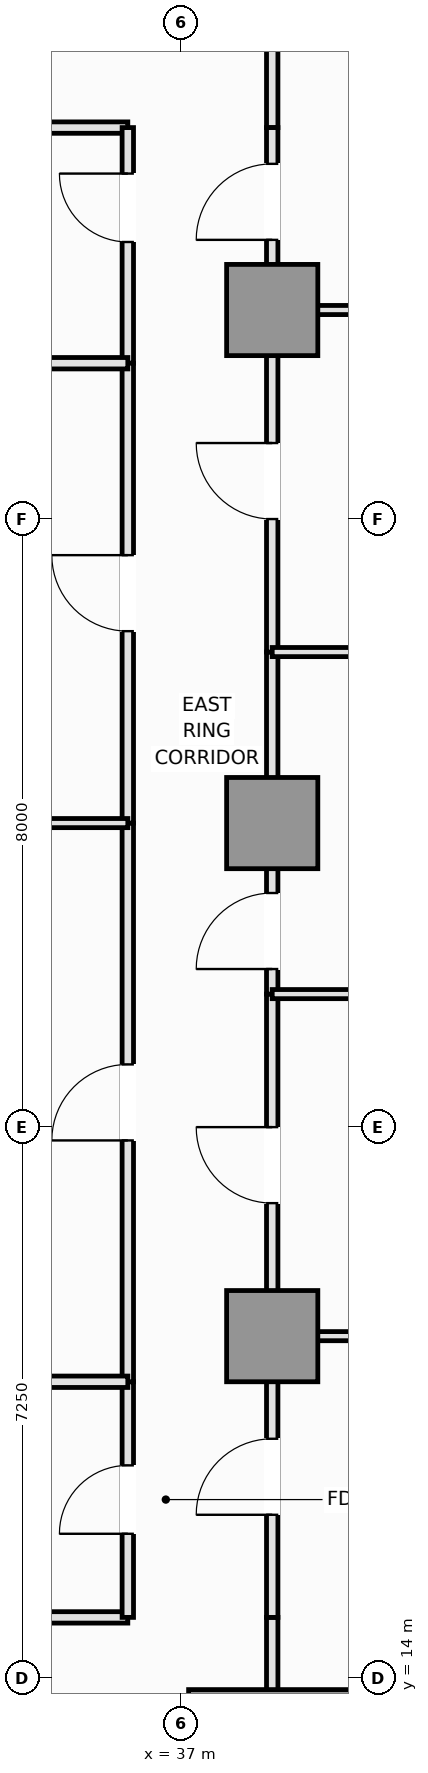
"""IFC4 building model, lengths in metres.
Left out: names, types, materials, properties, quantities, classifications, styles, units other than length and angle.
Written with IfcOpenShell. Run it as: python <this file> out.ifc"""

import sys

from ifc_helpers import new_model, si_unit, direction, frame, frame_2d, origin, origin_2d, place, context, subcontext, project, spatial, rectangle, extrude, element, fill, save


model = new_model("IFC4")
c1 = context("Model", 3, precision=1e-05, world=origin(), true_north=direction((0.0, 1.0)))
c2 = subcontext(c1, "Body", "Model", "MODEL_VIEW")
j1 = project(units=[si_unit("LENGTHUNIT", "METRE"), si_unit("PLANEANGLEUNIT", "RADIAN")], contexts=[c1])
p1 = place(None, origin())
s1 = spatial("IfcSite", under=j1, at=p1, CompositionType="ELEMENT")
p2 = place(p1, origin())
s2 = spatial("IfcBuilding", under=s1, at=p2, CompositionType="ELEMENT")
p3 = place(p2, frame((0.0, 0.0, 82.4)))
s3 = spatial("IfcBuildingStorey", under=s2, at=p3, CompositionType="ELEMENT", Elevation=82.4)
p4 = place(p3, frame((38.2, 12.75, 0.0), z_axis=(0.0, 0.0, 1.0), x_axis=(1.0, 0.0, 0.0)))
e1 = element("IfcColumn", 1, at=p4, inside=s3, PredefinedType="COLUMN", context=c2, shape_type="SweptSolid", body=[
    extrude(rectangle(XDim=2.2, YDim=2.2, at=origin_2d()), origin(), (0.0, 0.0, 1.0), 3.55),
])
for number, where, z_axis, x_axis in (
    (2, (38.2, 18.5, 0.0), (0.0, 0.0, 1.0), (1.0, 0.0, 0.0)),
    (3, (38.2, 25.25, 0.0), (0.0, 0.0, 1.0), (1.0, 0.0, 0.0)),
    (4, (38.2, 32.0, 0.0), (0.0, 0.0, 1.0), (1.0, 0.0, 0.0)),
):
    element("IfcColumn", number, at=place(p3, frame(where, z_axis=z_axis, x_axis=x_axis)), inside=s3, PredefinedType="COLUMN", context=c2, shape_type="SweptSolid", body=[
        extrude(rectangle(XDim=1.2, YDim=1.2, at=origin_2d()), origin(), (0.0, 0.0, 1.0), 3.55),
    ])
p5 = place(p3, frame((33.1, 14.8, 0.0), z_axis=(0.0, 0.0, 1.0), x_axis=(1.0, 0.0, 0.0)))
e5 = element("IfcWall", 5, at=p5, inside=s3, PredefinedType="PLUMBINGWALL", context=c2, shape_type="SweptSolid", body=[
    extrude(rectangle(XDim=3.2, YDim=0.15, at=frame_2d((1.6, 0.0))), origin(), (0.0, 0.0, 1.0), 3.37),
])
p6 = place(p3, frame((38.2, 12.9, 0.0), z_axis=(0.0, 0.0, 1.0), x_axis=(0.0, 1.0, 0.0)))
e6 = element("IfcWall", 6, at=p6, inside=s3, PredefinedType="PARTITIONING", context=c2, shape_type="SweptSolid", body=[
    extrude(rectangle(XDim=1.9, YDim=0.15, at=frame_2d((0.95, 0.0))), origin(), (0.0, 0.0, 1.0), 2.82),
])
p7 = place(p3, frame((33.1, 34.4, 0.0), z_axis=(0.0, 0.0, 1.0), x_axis=(1.0, 0.0, 0.0)))
e7 = element("IfcWall", 7, at=p7, inside=s3, PredefinedType="PLUMBINGWALL", context=c2, shape_type="SweptSolid", body=[
    extrude(rectangle(XDim=3.2, YDim=0.15, at=frame_2d((1.6, 0.0))), origin(), (0.0, 0.0, 1.0), 3.37),
])
p8 = place(p3, frame((38.2, 34.4, 0.0), z_axis=(0.0, 0.0, 1.0), x_axis=(0.0, 1.0, 0.0)))
e8 = element("IfcWall", 8, at=p8, inside=s3, PredefinedType="PARTITIONING", context=c2, shape_type="SweptSolid", body=[
    extrude(rectangle(XDim=1.9, YDim=0.15, at=frame_2d((0.95, 0.0))), origin(), (0.0, 0.0, 1.0), 2.82),
])
p9 = place(p3, frame((36.3, 14.8, 0.0), z_axis=(0.0, 0.0, 1.0), x_axis=(0.0, 1.0, 0.0)))
e9 = element("IfcWall", 9, at=p9, inside=s3, PredefinedType="PLUMBINGWALL", context=c2, shape_type="SweptSolid", body=[
    extrude(rectangle(XDim=3.1, YDim=0.15, at=frame_2d((1.55, 0.0))), origin(), (0.0, 0.0, 1.0), 3.37),
])
p10 = place(p9, frame((1.1, 0.0, 0.0)))
e10 = element("IfcOpeningElement", 10, at=p10, cuts=e9, PredefinedType="OPENING", context=c2, shape_type="SweptSolid", body=[
    extrude(rectangle(XDim=0.9, YDim=2.1, at=frame_2d((0.45, 1.05))), frame((0.0, 0.085, 0.0), z_axis=(0.0, -1.0, 0.0), x_axis=(1.0, 0.0, 0.0)), (0.0, 0.0, 1.0), 0.17),
])
p11 = place(p3, frame((36.3, 31.3, 0.0), z_axis=(0.0, 0.0, 1.0), x_axis=(0.0, 1.0, 0.0)))
e11 = element("IfcWall", 11, at=p11, inside=s3, PredefinedType="PLUMBINGWALL", context=c2, shape_type="SweptSolid", body=[
    extrude(rectangle(XDim=3.1, YDim=0.15, at=frame_2d((1.55, 0.0))), origin(), (0.0, 0.0, 1.0), 3.37),
])
p12 = place(p11, frame((1.595, 0.0, 0.0)))
e12 = element("IfcOpeningElement", 12, at=p12, cuts=e11, PredefinedType="OPENING", context=c2, shape_type="SweptSolid", body=[
    extrude(rectangle(XDim=0.9, YDim=2.1, at=frame_2d((0.45, 1.05))), frame((0.0, 0.085, 0.0), z_axis=(0.0, -1.0, 0.0), x_axis=(1.0, 0.0, 0.0)), (0.0, 0.0, 1.0), 0.17),
])
p13 = place(p3, frame((36.3, 17.9, 0.0), z_axis=(0.0, 0.0, 1.0), x_axis=(0.0, 1.0, 0.0)))
e13 = element("IfcWall", 13, at=p13, inside=s3, PredefinedType="PARTITIONING", context=c2, shape_type="SweptSolid", body=[
    extrude(rectangle(XDim=7.35, YDim=0.15, at=frame_2d((3.675, 0.0))), origin(), (0.0, 0.0, 1.0), 3.37),
])
p14 = place(p13, frame((3.175, 0.0, 0.0)))
e14 = element("IfcOpeningElement", 14, at=p14, cuts=e13, PredefinedType="OPENING", context=c2, shape_type="SweptSolid", body=[
    extrude(rectangle(XDim=1.0, YDim=2.15, at=frame_2d((0.5, 1.075))), frame((0.0, 0.085, 0.0), z_axis=(0.0, -1.0, 0.0), x_axis=(1.0, 0.0, 0.0)), (0.0, 0.0, 1.0), 0.17),
])
p15 = place(p3, frame((36.3, 25.25, 0.0), z_axis=(0.0, 0.0, 1.0), x_axis=(0.0, 1.0, 0.0)))
e15 = element("IfcWall", 15, at=p15, inside=s3, PredefinedType="PARTITIONING", context=c2, shape_type="SweptSolid", body=[
    extrude(rectangle(XDim=6.05, YDim=0.15, at=frame_2d((3.025, 0.0))), origin(), (0.0, 0.0, 1.0), 3.37),
])
p16 = place(p15, frame((2.525, 0.0, 0.0)))
e16 = element("IfcOpeningElement", 16, at=p16, cuts=e15, PredefinedType="OPENING", context=c2, shape_type="SweptSolid", body=[
    extrude(rectangle(XDim=1.0, YDim=2.15, at=frame_2d((0.5, 1.075))), frame((0.0, 0.085, 0.0), z_axis=(0.0, -1.0, 0.0), x_axis=(1.0, 0.0, 0.0)), (0.0, 0.0, 1.0), 0.17),
])
p17 = place(p3, frame((38.2, 14.8, 0.0), z_axis=(0.0, 0.0, 1.0), x_axis=(0.0, 1.0, 0.0)))
e17 = element("IfcWall", 17, at=p17, inside=s3, PredefinedType="PARTITIONING", context=c2, shape_type="SweptSolid", body=[
    extrude(rectangle(XDim=3.7, YDim=0.15, at=frame_2d((1.85, 0.0))), origin(), (0.0, 0.0, 1.0), 2.82),
])
p18 = place(p17, frame((1.35, 0.0, 0.0)))
e18 = element("IfcOpeningElement", 18, at=p18, cuts=e17, PredefinedType="OPENING", context=c2, shape_type="SweptSolid", body=[
    extrude(rectangle(XDim=1.0, YDim=2.15, at=frame_2d((0.5, 1.075))), frame((0.0, 0.085, 0.0), z_axis=(0.0, -1.0, 0.0), x_axis=(1.0, 0.0, 0.0)), (0.0, 0.0, 1.0), 0.17),
])
p19 = place(p3, frame((38.2, 18.5, 0.0), z_axis=(0.0, 0.0, 1.0), x_axis=(0.0, 1.0, 0.0)))
e19 = element("IfcWall", 19, at=p19, inside=s3, PredefinedType="PARTITIONING", context=c2, shape_type="SweptSolid", body=[
    extrude(rectangle(XDim=4.5, YDim=0.15, at=frame_2d((2.25, 0.0))), origin(), (0.0, 0.0, 1.0), 2.82),
])
p20 = place(p19, frame((1.75, 0.0, 0.0)))
e20 = element("IfcOpeningElement", 20, at=p20, cuts=e19, PredefinedType="OPENING", context=c2, shape_type="SweptSolid", body=[
    extrude(rectangle(XDim=1.0, YDim=2.15, at=frame_2d((0.5, 1.075))), frame((0.0, 0.085, 0.0), z_axis=(0.0, -1.0, 0.0), x_axis=(1.0, 0.0, 0.0)), (0.0, 0.0, 1.0), 0.17),
])
p21 = place(p3, frame((38.2, 23.0, 0.0), z_axis=(0.0, 0.0, 1.0), x_axis=(0.0, 1.0, 0.0)))
e21 = element("IfcWall", 21, at=p21, inside=s3, PredefinedType="PARTITIONING", context=c2, shape_type="SweptSolid", body=[
    extrude(rectangle(XDim=4.5, YDim=0.15, at=frame_2d((2.25, 0.0))), origin(), (0.0, 0.0, 1.0), 2.82),
])
p22 = place(p21, frame((0.33, 0.0, 0.0)))
e22 = element("IfcOpeningElement", 22, at=p22, cuts=e21, PredefinedType="OPENING", context=c2, shape_type="SweptSolid", body=[
    extrude(rectangle(XDim=1.0, YDim=2.15, at=frame_2d((0.5, 1.075))), frame((0.0, 0.085, 0.0), z_axis=(0.0, -1.0, 0.0), x_axis=(1.0, 0.0, 0.0)), (0.0, 0.0, 1.0), 0.17),
])
p23 = place(p3, frame((38.2, 27.5, 0.0), z_axis=(0.0, 0.0, 1.0), x_axis=(0.0, 1.0, 0.0)))
e23 = element("IfcWall", 23, at=p23, inside=s3, PredefinedType="PARTITIONING", context=c2, shape_type="SweptSolid", body=[
    extrude(rectangle(XDim=4.5, YDim=0.15, at=frame_2d((2.25, 0.0))), origin(), (0.0, 0.0, 1.0), 2.82),
])
p24 = place(p23, frame((1.75, 0.0, 0.0)))
e24 = element("IfcOpeningElement", 24, at=p24, cuts=e23, PredefinedType="OPENING", context=c2, shape_type="SweptSolid", body=[
    extrude(rectangle(XDim=1.0, YDim=2.15, at=frame_2d((0.5, 1.075))), frame((0.0, 0.085, 0.0), z_axis=(0.0, -1.0, 0.0), x_axis=(1.0, 0.0, 0.0)), (0.0, 0.0, 1.0), 0.17),
])
p25 = place(p3, frame((38.2, 32.0, 0.0), z_axis=(0.0, 0.0, 1.0), x_axis=(0.0, 1.0, 0.0)))
e25 = element("IfcWall", 25, at=p25, inside=s3, PredefinedType="PARTITIONING", context=c2, shape_type="SweptSolid", body=[
    extrude(rectangle(XDim=2.4, YDim=0.15, at=frame_2d((1.2, 0.0))), origin(), (0.0, 0.0, 1.0), 2.82),
])
p26 = place(p25, frame((0.923, 0.0, 0.0)))
e26 = element("IfcOpeningElement", 26, at=p26, cuts=e25, PredefinedType="OPENING", context=c2, shape_type="SweptSolid", body=[
    extrude(rectangle(XDim=1.0, YDim=2.15, at=frame_2d((0.5, 1.075))), frame((0.0, 0.085, 0.0), z_axis=(0.0, -1.0, 0.0), x_axis=(1.0, 0.0, 0.0)), (0.0, 0.0, 1.0), 0.17),
])
for number, where, z_axis, x_axis in (
    (27, (33.1, 17.9, 0.0), (0.0, 0.0, 1.0), (1.0, 0.0, 0.0)),
    (28, (33.1, 31.3, 0.0), (0.0, 0.0, 1.0), (1.0, 0.0, 0.0)),
):
    element("IfcWall", number, at=place(p3, frame(where, z_axis=z_axis, x_axis=x_axis)), inside=s3, PredefinedType="PLUMBINGWALL", context=c2, shape_type="SweptSolid", body=[
        extrude(rectangle(XDim=3.2, YDim=0.15, at=frame_2d((1.6, 0.0))), origin(), (0.0, 0.0, 1.0), 3.37),
    ])
p27 = place(p3, frame((27.5, 25.25, 0.0), z_axis=(0.0, 0.0, 1.0), x_axis=(1.0, 0.0, 0.0)))
e29 = element("IfcWall", 29, at=p27, inside=s3, PredefinedType="PARTITIONING", context=c2, shape_type="SweptSolid", body=[
    extrude(rectangle(XDim=8.8, YDim=0.12, at=frame_2d((4.4, 0.0))), origin(), (0.0, 0.0, 1.0), 2.72),
])
p28 = place(p3, frame((38.2, 18.5, 0.0), z_axis=(0.0, 0.0, 1.0), x_axis=(1.0, 0.0, 0.0)))
e30 = element("IfcWall", 30, at=p28, inside=s3, PredefinedType="PARTITIONING", context=c2, shape_type="SweptSolid", body=[
    extrude(rectangle(XDim=15.29, YDim=0.12, at=frame_2d((7.645, 0.0))), origin(), (0.0, 0.0, 1.0), 2.72),
])
for number, where, z_axis, x_axis in (
    (31, (38.2, 23.0, 0.0), (0.0, 0.0, 1.0), (1.0, 0.0, 0.0)),
    (32, (38.2, 27.5, 0.0), (0.0, 0.0, 1.0), (1.0, 0.0, 0.0)),
):
    element("IfcWall", number, at=place(p3, frame(where, z_axis=z_axis, x_axis=x_axis)), inside=s3, PredefinedType="PARTITIONING", context=c2, shape_type="SweptSolid", body=[
        extrude(rectangle(XDim=15.29, YDim=0.12, at=frame_2d((7.645, 0.0))), origin(), (0.0, 0.0, 1.0), 3.37),
    ])
p29 = place(p3, frame((38.2, 32.0, 0.0), z_axis=(0.0, 0.0, 1.0), x_axis=(1.0, 0.0, 0.0)))
e33 = element("IfcWall", 33, at=p29, inside=s3, PredefinedType="PARTITIONING", context=c2, shape_type="SweptSolid", body=[
    extrude(rectangle(XDim=15.29, YDim=0.12, at=frame_2d((7.645, 0.0))), origin(), (0.0, 0.0, 1.0), 2.72),
])
p30 = place(p10, origin())
e34 = element("IfcDoor", 34, at=p30, inside=s3, OperationType="SINGLE_SWING_LEFT", PredefinedType="DOOR", context=c2, shape_type="SweptSolid", body=[
    extrude(rectangle(XDim=0.9, YDim=2.1, at=frame_2d((0.45, 1.05))), frame((0.0, 0.025, 0.0), z_axis=(0.0, -1.0, 0.0), x_axis=(1.0, 0.0, 0.0)), (0.0, 0.0, 1.0), 0.05),
])
fill(e10, e34)
p31 = place(p12, origin())
e35 = element("IfcDoor", 35, at=p31, inside=s3, OperationType="SINGLE_SWING_RIGHT", PredefinedType="DOOR", context=c2, shape_type="SweptSolid", body=[
    extrude(rectangle(XDim=0.9, YDim=2.1, at=frame_2d((0.45, 1.05))), frame((0.0, 0.025, 0.0), z_axis=(0.0, -1.0, 0.0), x_axis=(1.0, 0.0, 0.0)), (0.0, 0.0, 1.0), 0.05),
])
fill(e12, e35)
p32 = place(p14, origin())
e36 = element("IfcDoor", 36, at=p32, inside=s3, OperationType="SINGLE_SWING_LEFT", PredefinedType="DOOR", context=c2, shape_type="SweptSolid", body=[
    extrude(rectangle(XDim=1.0, YDim=2.15, at=frame_2d((0.5, 1.075))), frame((0.0, 0.025, 0.0), z_axis=(0.0, -1.0, 0.0), x_axis=(1.0, 0.0, 0.0)), (0.0, 0.0, 1.0), 0.05),
])
fill(e14, e36)
p33 = place(p16, origin())
e37 = element("IfcDoor", 37, at=p33, inside=s3, OperationType="SINGLE_SWING_RIGHT", PredefinedType="DOOR", context=c2, shape_type="SweptSolid", body=[
    extrude(rectangle(XDim=1.0, YDim=2.15, at=frame_2d((0.5, 1.075))), frame((0.0, 0.025, 0.0), z_axis=(0.0, -1.0, 0.0), x_axis=(1.0, 0.0, 0.0)), (0.0, 0.0, 1.0), 0.05),
])
fill(e16, e37)
p34 = place(p18, origin())
e38 = element("IfcDoor", 38, at=p34, inside=s3, OperationType="SINGLE_SWING_LEFT", PredefinedType="DOOR", context=c2, shape_type="SweptSolid", body=[
    extrude(rectangle(XDim=1.0, YDim=2.15, at=frame_2d((0.5, 1.075))), frame((0.0, 0.025, 0.0), z_axis=(0.0, -1.0, 0.0), x_axis=(1.0, 0.0, 0.0)), (0.0, 0.0, 1.0), 0.05),
])
fill(e18, e38)
p35 = place(p20, origin())
e39 = element("IfcDoor", 39, at=p35, inside=s3, OperationType="SINGLE_SWING_RIGHT", PredefinedType="DOOR", context=c2, shape_type="SweptSolid", body=[
    extrude(rectangle(XDim=1.0, YDim=2.15, at=frame_2d((0.5, 1.075))), frame((0.0, 0.025, 0.0), z_axis=(0.0, -1.0, 0.0), x_axis=(1.0, 0.0, 0.0)), (0.0, 0.0, 1.0), 0.05),
])
fill(e20, e39)
p36 = place(p22, origin())
e40 = element("IfcDoor", 40, at=p36, inside=s3, OperationType="SINGLE_SWING_LEFT", PredefinedType="DOOR", context=c2, shape_type="SweptSolid", body=[
    extrude(rectangle(XDim=1.0, YDim=2.15, at=frame_2d((0.5, 1.075))), frame((0.0, 0.025, 0.0), z_axis=(0.0, -1.0, 0.0), x_axis=(1.0, 0.0, 0.0)), (0.0, 0.0, 1.0), 0.05),
])
fill(e22, e40)
p37 = place(p24, origin())
e41 = element("IfcDoor", 41, at=p37, inside=s3, OperationType="SINGLE_SWING_RIGHT", PredefinedType="DOOR", context=c2, shape_type="SweptSolid", body=[
    extrude(rectangle(XDim=1.0, YDim=2.15, at=frame_2d((0.5, 1.075))), frame((0.0, 0.025, 0.0), z_axis=(0.0, -1.0, 0.0), x_axis=(1.0, 0.0, 0.0)), (0.0, 0.0, 1.0), 0.05),
])
fill(e24, e41)
p38 = place(p26, origin())
e42 = element("IfcDoor", 42, at=p38, inside=s3, OperationType="SINGLE_SWING_LEFT", PredefinedType="DOOR", context=c2, shape_type="SweptSolid", body=[
    extrude(rectangle(XDim=1.0, YDim=2.15, at=frame_2d((0.5, 1.075))), frame((0.0, 0.025, 0.0), z_axis=(0.0, -1.0, 0.0), x_axis=(1.0, 0.0, 0.0)), (0.0, 0.0, 1.0), 0.05),
])
fill(e26, e42)
save(model, sys.argv[1])
